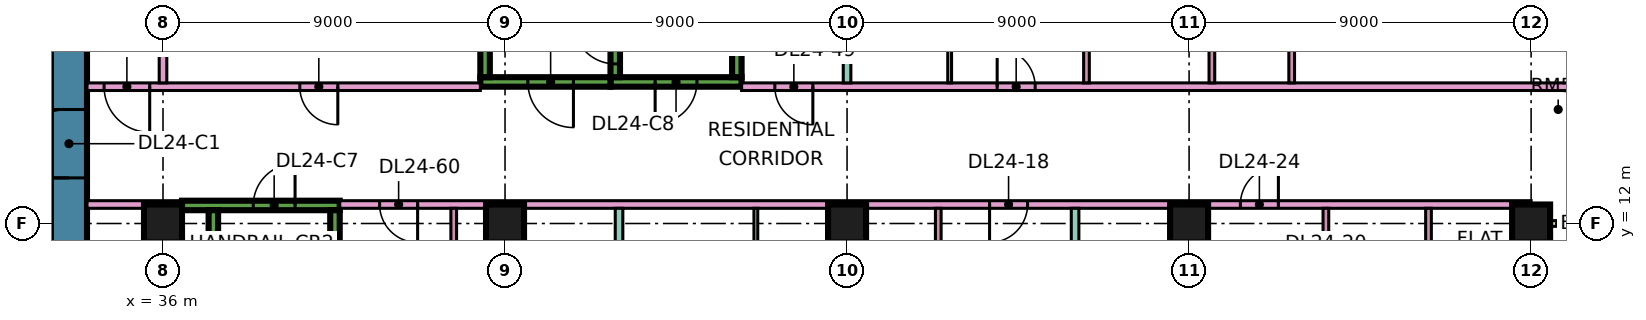
"""IFC4 building model, lengths in metres.
Left out: names, types, materials, properties, quantities, classifications, styles, units other than length and angle.
Written with IfcOpenShell. Run it as: python <this file> out.ifc"""

import sys

from ifc_helpers import new_model, si_unit, direction, frame, frame_2d, origin, origin_2d, place, context, subcontext, project, spatial, rectangle, extrude, element, fill, save


model = new_model("IFC4")
c1 = context("Model", 3, precision=1e-05, world=origin(), true_north=direction((0.0, 1.0)))
c2 = subcontext(c1, "Body", "Model", "MODEL_VIEW")
j1 = project(units=[si_unit("LENGTHUNIT", "METRE"), si_unit("PLANEANGLEUNIT", "RADIAN")], contexts=[c1])
p1 = place(None, origin())
s1 = spatial("IfcSite", under=j1, at=p1, CompositionType="ELEMENT")
p2 = place(p1, origin())
s2 = spatial("IfcBuilding", under=s1, at=p2, CompositionType="ELEMENT")
p3 = place(p2, frame((0.0, 0.0, 106.9)))
s3 = spatial("IfcBuildingStorey", under=s2, at=p3, CompositionType="ELEMENT", Elevation=106.9)
for number, where, z_axis, x_axis in (
    (1, (36.0, 12.0, 0.0), (0.0, 0.0, 1.0), (1.0, 0.0, 0.0)),
    (2, (45.0, 12.0, 0.0), (0.0, 0.0, 1.0), (1.0, 0.0, 0.0)),
    (3, (54.0, 12.0, 0.0), (0.0, 0.0, 1.0), (1.0, 0.0, 0.0)),
    (4, (63.0, 12.0, 0.0), (0.0, 0.0, 1.0), (1.0, 0.0, 0.0)),
    (5, (72.0, 12.0, 0.0), (0.0, 0.0, 1.0), (1.0, 0.0, 0.0)),
):
    element("IfcColumn", number, at=place(p3, frame(where, z_axis=z_axis, x_axis=x_axis)), inside=s3, PredefinedType="COLUMN", context=c2, shape_type="SweptSolid", body=[
        extrude(rectangle(XDim=1.0, YDim=1.0, at=origin_2d()), origin(), (0.0, 0.0, 1.0), 3.75),
    ])
p4 = place(p3, frame((33.525, 7.95, 0.0), z_axis=(0.0, 0.0, 1.0), x_axis=(0.0, 1.0, 0.0)))
e6 = element("IfcWall", 6, at=p4, inside=s3, PredefinedType="SHEAR", context=c2, shape_type="SweptSolid", body=[
    extrude(rectangle(XDim=11.1, YDim=0.95, at=frame_2d((5.55, 0.0))), origin(), (0.0, 0.0, 1.0), 3.75),
])
p5 = place(p4, frame((5.25, 0.0, 0.0)))
e7 = element("IfcOpeningElement", 7, at=p5, cuts=e6, PredefinedType="OPENING", context=c2, shape_type="SweptSolid", body=[
    extrude(rectangle(XDim=1.8, YDim=2.4, at=frame_2d((0.9, 1.2))), frame((0.0, 0.485, 0.0), z_axis=(0.0, -1.0, 0.0), x_axis=(1.0, 0.0, 0.0)), (0.0, 0.0, 1.0), 0.97),
])
p6 = place(p3, frame((36.5, 12.475, 0.0), z_axis=(0.0, 0.0, 1.0), x_axis=(1.0, 0.0, 0.0)))
e8 = element("IfcWall", 8, at=p6, inside=s3, PredefinedType="SHEAR", context=c2, shape_type="SweptSolid", body=[
    extrude(rectangle(XDim=4.15, YDim=0.25, at=frame_2d((2.075, 0.0))), origin(), (0.0, 0.0, 1.0), 3.75),
])
p7 = place(p6, frame((1.875, 0.0, 0.0)))
e9 = element("IfcOpeningElement", 9, at=p7, cuts=e8, PredefinedType="OPENING", context=c2, shape_type="SweptSolid", body=[
    extrude(rectangle(XDim=1.1, YDim=2.2, at=frame_2d((0.55, 1.1))), frame((0.0, 0.135, 0.0), z_axis=(0.0, -1.0, 0.0), x_axis=(1.0, 0.0, 0.0)), (0.0, 0.0, 1.0), 0.27),
])
for number, where, z_axis, x_axis in (
    (10, (37.325, 5.85, 0.0), (0.0, 0.0, 1.0), (0.0, 1.0, 0.0)),
    (11, (40.525, 5.85, 0.0), (0.0, 0.0, 1.0), (0.0, 1.0, 0.0)),
):
    element("IfcWall", number, at=place(p3, frame(where, z_axis=z_axis, x_axis=x_axis)), inside=s3, PredefinedType="SHEAR", context=c2, shape_type="SweptSolid", body=[
        extrude(rectangle(XDim=6.5, YDim=0.25, at=frame_2d((3.25, 0.0))), origin(), (0.0, 0.0, 1.0), 3.75),
    ])
p8 = place(p3, frame((47.775, 15.725, 0.0), z_axis=(0.0, 0.0, 1.0), x_axis=(1.0, 0.0, 0.0)))
e12 = element("IfcWall", 12, at=p8, inside=s3, PredefinedType="SHEAR", context=c2, shape_type="SweptSolid", body=[
    extrude(rectangle(XDim=3.45, YDim=0.25, at=frame_2d((1.725, 0.0))), origin(), (0.0, 0.0, 1.0), 3.75),
])
p9 = place(p8, frame((1.175, 0.0, 0.0)))
e13 = element("IfcOpeningElement", 13, at=p9, cuts=e12, PredefinedType="OPENING", context=c2, shape_type="SweptSolid", body=[
    extrude(rectangle(XDim=1.1, YDim=2.2, at=frame_2d((0.55, 1.1))), frame((0.0, 0.135, 0.0), z_axis=(0.0, -1.0, 0.0), x_axis=(1.0, 0.0, 0.0)), (0.0, 0.0, 1.0), 0.27),
])
p10 = place(p3, frame((47.9, 15.85, 0.0), z_axis=(0.0, 0.0, 1.0), x_axis=(0.0, 1.0, 0.0)))
e14 = element("IfcWall", 14, at=p10, inside=s3, PredefinedType="SHEAR", context=c2, shape_type="SweptSolid", body=[
    extrude(rectangle(XDim=6.5, YDim=0.25, at=frame_2d((3.25, 0.0))), origin(), (0.0, 0.0, 1.0), 3.75),
])
p11 = place(p10, frame((0.35, 0.0, 0.0)))
e15 = element("IfcOpeningElement", 15, at=p11, cuts=e14, PredefinedType="OPENING", context=c2, shape_type="SweptSolid", body=[
    extrude(rectangle(XDim=1.1, YDim=2.2, at=frame_2d((0.55, 1.1))), frame((0.0, 0.135, 0.0), z_axis=(0.0, -1.0, 0.0), x_axis=(1.0, 0.0, 0.0)), (0.0, 0.0, 1.0), 0.27),
])
p12 = place(p3, frame((51.1, 15.85, 0.0), z_axis=(0.0, 0.0, 1.0), x_axis=(0.0, 1.0, 0.0)))
e16 = element("IfcWall", 16, at=p12, inside=s3, PredefinedType="SHEAR", context=c2, shape_type="SweptSolid", body=[
    extrude(rectangle(XDim=6.5, YDim=0.25, at=frame_2d((3.25, 0.0))), origin(), (0.0, 0.0, 1.0), 3.75),
])
p13 = place(p3, frame((44.35, 15.725, 0.0), z_axis=(0.0, 0.0, 1.0), x_axis=(1.0, 0.0, 0.0)))
e17 = element("IfcWall", 17, at=p13, inside=s3, PredefinedType="SHEAR", context=c2, shape_type="SweptSolid", body=[
    extrude(rectangle(XDim=3.425, YDim=0.25, at=frame_2d((1.712, 0.0))), origin(), (0.0, 0.0, 1.0), 3.75),
])
p14 = place(p13, frame((1.25, 0.0, 0.0)))
e18 = element("IfcOpeningElement", 18, at=p14, cuts=e17, PredefinedType="OPENING", context=c2, shape_type="SweptSolid", body=[
    extrude(rectangle(XDim=1.2, YDim=2.2, at=frame_2d((0.6, 1.1))), frame((0.0, 0.135, 0.0), z_axis=(0.0, -1.0, 0.0), x_axis=(1.0, 0.0, 0.0)), (0.0, 0.0, 1.0), 0.27),
])
p15 = place(p3, frame((44.475, 15.85, 0.0), z_axis=(0.0, 0.0, 1.0), x_axis=(0.0, 1.0, 0.0)))
e19 = element("IfcWall", 19, at=p15, inside=s3, PredefinedType="SHEAR", context=c2, shape_type="SweptSolid", body=[
    extrude(rectangle(XDim=6.5, YDim=0.25, at=frame_2d((3.25, 0.0))), origin(), (0.0, 0.0, 1.0), 3.75),
])
p16 = place(p15, frame((1.75, 0.0, 0.0)))
e20 = element("IfcOpeningElement", 20, at=p16, cuts=e19, PredefinedType="OPENING", context=c2, shape_type="SweptSolid", body=[
    extrude(rectangle(XDim=1.1, YDim=2.2, at=frame_2d((0.55, 1.1))), frame((0.0, 0.135, 0.0), z_axis=(0.0, -1.0, 0.0), x_axis=(1.0, 0.0, 0.0)), (0.0, 0.0, 1.0), 0.27),
])
p17 = place(p15, frame((4.3, 0.0, 0.0)))
e21 = element("IfcOpeningElement", 21, at=p17, cuts=e19, PredefinedType="OPENING", context=c2, shape_type="SweptSolid", body=[
    extrude(rectangle(XDim=1.1, YDim=2.2, at=frame_2d((0.55, 1.1))), frame((0.0, 0.135, 0.0), z_axis=(0.0, -1.0, 0.0), x_axis=(1.0, 0.0, 0.0)), (0.0, 0.0, 1.0), 0.27),
])
p18 = place(p3, frame((72.0, 1.575, 0.0), z_axis=(0.0, 0.0, 1.0), x_axis=(0.0, 1.0, 0.0)))
e22 = element("IfcWall", 22, at=p18, inside=s3, PredefinedType="SOLIDWALL", context=c2, shape_type="SweptSolid", body=[
    extrude(rectangle(XDim=10.35, YDim=0.15, at=frame_2d((5.175, 0.0))), origin(), (0.0, 0.0, 1.0), 3.35),
])
p19 = place(p18, frame((2.462, 0.0, 0.0)))
e23 = element("IfcOpeningElement", 23, at=p19, cuts=e22, PredefinedType="OPENING", context=c2, shape_type="SweptSolid", body=[
    extrude(rectangle(XDim=1.8, YDim=2.4, at=frame_2d((0.9, 1.2))), frame((0.0, 0.085, 0.0), z_axis=(0.0, -1.0, 0.0), x_axis=(1.0, 0.0, 0.0)), (0.0, 0.0, 1.0), 0.17),
])
p20 = place(p3, frame((73.5, 12.0, 0.0), z_axis=(0.0, 0.0, 1.0), x_axis=(-1.0, 0.0, 0.0)))
e24 = element("IfcWall", 24, at=p20, inside=s3, PredefinedType="SOLIDWALL", context=c2, shape_type="SweptSolid", body=[
    extrude(rectangle(XDim=1.5, YDim=0.15, at=frame_2d((0.75, 0.0))), origin(), (0.0, 0.0, 1.0), 3.35),
])
p21 = place(p3, frame((34.0, 12.5, 0.0), z_axis=(0.0, 0.0, 1.0), x_axis=(1.0, 0.0, 0.0)))
e25 = element("IfcWall", 25, at=p21, inside=s3, PredefinedType="PARTITIONING", context=c2, shape_type="SweptSolid", body=[
    extrude(rectangle(XDim=2.501, YDim=0.2, at=frame_2d((1.25, 0.0))), origin(), (0.0, 0.0, 1.0), 3.35),
])
p22 = place(p3, frame((34.0, 15.6, 0.0), z_axis=(0.0, 0.0, 1.0), x_axis=(1.0, 0.0, 0.0)))
e26 = element("IfcWall", 26, at=p22, inside=s3, PredefinedType="PARTITIONING", context=c2, shape_type="SweptSolid", body=[
    extrude(rectangle(XDim=10.35, YDim=0.2, at=frame_2d((5.175, 0.0))), origin(), (0.0, 0.0, 1.0), 3.35),
])
p23 = place(p22, frame((5.6, 0.0, 0.0)))
e27 = element("IfcOpeningElement", 27, at=p23, cuts=e26, PredefinedType="OPENING", context=c2, shape_type="SweptSolid", body=[
    extrude(rectangle(XDim=1.0, YDim=2.1, at=frame_2d((0.5, 1.05))), frame((0.0, 0.11, 0.0), z_axis=(0.0, -1.0, 0.0), x_axis=(1.0, 0.0, 0.0)), (0.0, 0.0, 1.0), 0.22),
])
p24 = place(p22, frame((0.45, 0.0, 0.0)))
e28 = element("IfcOpeningElement", 28, at=p24, cuts=e26, PredefinedType="OPENING", context=c2, shape_type="SweptSolid", body=[
    extrude(rectangle(XDim=1.2, YDim=2.1, at=frame_2d((0.6, 1.05))), frame((0.0, 0.11, 0.0), z_axis=(0.0, -1.0, 0.0), x_axis=(1.0, 0.0, 0.0)), (0.0, 0.0, 1.0), 0.22),
])
p25 = place(p3, frame((36.0, 15.7, 0.0), z_axis=(0.0, 0.0, 1.0), x_axis=(0.0, 1.0, 0.0)))
e29 = element("IfcWall", 29, at=p25, inside=s3, PredefinedType="PARTITIONING", context=c2, shape_type="SweptSolid", body=[
    extrude(rectangle(XDim=8.3, YDim=0.2, at=frame_2d((4.15, 0.0))), origin(), (0.0, 0.0, 1.0), 3.35),
])
p26 = place(p3, frame((40.65, 12.5, 0.0), z_axis=(0.0, 0.0, 1.0), x_axis=(1.0, 0.0, 0.0)))
e30 = element("IfcWall", 30, at=p26, inside=s3, PredefinedType="PARTITIONING", context=c2, shape_type="SweptSolid", body=[
    extrude(rectangle(XDim=31.35, YDim=0.2, at=frame_2d((15.675, 0.0))), origin(), (0.0, 0.0, 1.0), 3.35),
])
p27 = place(p26, frame((17.1, 0.0, 0.0)))
e31 = element("IfcOpeningElement", 31, at=p27, cuts=e30, PredefinedType="OPENING", context=c2, shape_type="SweptSolid", body=[
    extrude(rectangle(XDim=1.0, YDim=2.1, at=frame_2d((0.5, 1.05))), frame((0.0, 0.11, 0.0), z_axis=(0.0, -1.0, 0.0), x_axis=(1.0, 0.0, 0.0)), (0.0, 0.0, 1.0), 0.22),
])
p28 = place(p26, frame((23.7, 0.0, 0.0)))
e32 = element("IfcOpeningElement", 32, at=p28, cuts=e30, PredefinedType="OPENING", context=c2, shape_type="SweptSolid", body=[
    extrude(rectangle(XDim=1.0, YDim=2.1, at=frame_2d((0.5, 1.05))), frame((0.0, 0.11, 0.0), z_axis=(0.0, -1.0, 0.0), x_axis=(1.0, 0.0, 0.0)), (0.0, 0.0, 1.0), 0.22),
])
p29 = place(p26, frame((1.05, 0.0, 0.0)))
e33 = element("IfcOpeningElement", 33, at=p29, cuts=e30, PredefinedType="OPENING", context=c2, shape_type="SweptSolid", body=[
    extrude(rectangle(XDim=1.0, YDim=2.1, at=frame_2d((0.5, 1.05))), frame((0.0, 0.11, 0.0), z_axis=(0.0, -1.0, 0.0), x_axis=(1.0, 0.0, 0.0)), (0.0, 0.0, 1.0), 0.22),
])
p30 = place(p3, frame((43.65, 5.825, 0.0), z_axis=(0.0, 0.0, 1.0), x_axis=(0.0, 1.0, 0.0)))
e34 = element("IfcWall", 34, at=p30, inside=s3, PredefinedType="PARTITIONING", context=c2, shape_type="SweptSolid", body=[
    extrude(rectangle(XDim=6.575, YDim=0.15, at=frame_2d((3.288, 0.0))), origin(), (0.0, 0.0, 1.0), 3.35),
])
p31 = place(p30, frame((4.425, 0.0, 0.0)))
e35 = element("IfcOpeningElement", 35, at=p31, cuts=e34, PredefinedType="OPENING", context=c2, shape_type="SweptSolid", body=[
    extrude(rectangle(XDim=0.9, YDim=2.1, at=frame_2d((0.45, 1.05))), frame((0.0, 0.085, 0.0), z_axis=(0.0, -1.0, 0.0), x_axis=(1.0, 0.0, 0.0)), (0.0, 0.0, 1.0), 0.17),
])
p32 = place(p3, frame((48.0, 0.0, 0.0), z_axis=(0.0, 0.0, 1.0), x_axis=(0.0, 1.0, 0.0)))
e36 = element("IfcWall", 36, at=p32, inside=s3, PredefinedType="PARTITIONING", context=c2, shape_type="SweptSolid", body=[
    extrude(rectangle(XDim=12.4, YDim=0.2, at=frame_2d((6.2, 0.0))), origin(), (0.0, 0.0, 1.0), 3.35),
])
p33 = place(p3, frame((51.225, 15.6, 0.0), z_axis=(0.0, 0.0, 1.0), x_axis=(1.0, 0.0, 0.0)))
e37 = element("IfcWall", 37, at=p33, inside=s3, PredefinedType="PARTITIONING", context=c2, shape_type="SweptSolid", body=[
    extrude(rectangle(XDim=22.125, YDim=0.2, at=frame_2d((11.062, 0.0))), origin(), (0.0, 0.0, 1.0), 3.35),
])
p34 = place(p33, frame((6.725, 0.0, 0.0)))
e38 = element("IfcOpeningElement", 38, at=p34, cuts=e37, PredefinedType="OPENING", context=c2, shape_type="SweptSolid", body=[
    extrude(rectangle(XDim=1.0, YDim=2.1, at=frame_2d((0.5, 1.05))), frame((0.0, 0.11, 0.0), z_axis=(0.0, -1.0, 0.0), x_axis=(1.0, 0.0, 0.0)), (0.0, 0.0, 1.0), 0.22),
])
p35 = place(p33, frame((0.875, 0.0, 0.0)))
e39 = element("IfcOpeningElement", 39, at=p35, cuts=e37, PredefinedType="OPENING", context=c2, shape_type="SweptSolid", body=[
    extrude(rectangle(XDim=1.0, YDim=2.1, at=frame_2d((0.5, 1.05))), frame((0.0, 0.11, 0.0), z_axis=(0.0, -1.0, 0.0), x_axis=(1.0, 0.0, 0.0)), (0.0, 0.0, 1.0), 0.22),
])
p36 = place(p3, frame((51.6, 7.175, 0.0), z_axis=(0.0, 0.0, 1.0), x_axis=(0.0, 1.0, 0.0)))
e40 = element("IfcWall", 40, at=p36, inside=s3, PredefinedType="PARTITIONING", context=c2, shape_type="SweptSolid", body=[
    extrude(rectangle(XDim=5.225, YDim=0.1, at=frame_2d((2.612, 0.0))), origin(), (0.0, 0.0, 1.0), 3.35),
])
p37 = place(p3, frame((54.0, 7.175, 0.0), z_axis=(0.0, 0.0, 1.0), x_axis=(0.0, 1.0, 0.0)))
e41 = element("IfcWall", 41, at=p37, inside=s3, PredefinedType="PARTITIONING", context=c2, shape_type="SweptSolid", body=[
    extrude(rectangle(XDim=5.225, YDim=0.15, at=frame_2d((2.612, 0.0))), origin(), (0.0, 0.0, 1.0), 3.35),
])
p38 = place(p3, frame((54.0, 15.7, 0.0), z_axis=(0.0, 0.0, 1.0), x_axis=(0.0, 1.0, 0.0)))
e42 = element("IfcWall", 42, at=p38, inside=s3, PredefinedType="PARTITIONING", context=c2, shape_type="SweptSolid", body=[
    extrude(rectangle(XDim=8.226, YDim=0.2, at=frame_2d((4.113, 0.0))), origin(), (0.0, 0.0, 1.0), 3.35),
])
p39 = place(p3, frame((56.4, 7.175, 0.0), z_axis=(0.0, 0.0, 1.0), x_axis=(0.0, 1.0, 0.0)))
e43 = element("IfcWall", 43, at=p39, inside=s3, PredefinedType="PARTITIONING", context=c2, shape_type="SweptSolid", body=[
    extrude(rectangle(XDim=5.225, YDim=0.15, at=frame_2d((2.612, 0.0))), origin(), (0.0, 0.0, 1.0), 3.35),
])
p40 = place(p3, frame((56.7, 15.7, 0.0), z_axis=(0.0, 0.0, 1.0), x_axis=(0.0, 1.0, 0.0)))
e44 = element("IfcWall", 44, at=p40, inside=s3, PredefinedType="PARTITIONING", context=c2, shape_type="SweptSolid", body=[
    extrude(rectangle(XDim=2.95, YDim=0.1, at=frame_2d((1.475, 0.0))), origin(), (0.0, 0.0, 1.0), 3.35),
])
p41 = place(p40, frame((0.95, 0.0, 0.0)))
e45 = element("IfcOpeningElement", 45, at=p41, cuts=e44, PredefinedType="OPENING", context=c2, shape_type="SweptSolid", body=[
    extrude(rectangle(XDim=0.9, YDim=2.1, at=frame_2d((0.45, 1.05))), frame((0.0, 0.06, 0.0), z_axis=(0.0, -1.0, 0.0), x_axis=(1.0, 0.0, 0.0)), (0.0, 0.0, 1.0), 0.12),
])
p42 = place(p3, frame((60.0, 0.0, 0.0), z_axis=(0.0, 0.0, 1.0), x_axis=(0.0, 1.0, 0.0)))
e46 = element("IfcWall", 46, at=p42, inside=s3, PredefinedType="PARTITIONING", context=c2, shape_type="SweptSolid", body=[
    extrude(rectangle(XDim=12.4, YDim=0.2, at=frame_2d((6.2, 0.0))), origin(), (0.0, 0.0, 1.0), 3.35),
])
p43 = place(p3, frame((60.3, 15.7, 0.0), z_axis=(0.0, 0.0, 1.0), x_axis=(0.0, 1.0, 0.0)))
e47 = element("IfcWall", 47, at=p43, inside=s3, PredefinedType="PARTITIONING", context=c2, shape_type="SweptSolid", body=[
    extrude(rectangle(XDim=2.825, YDim=0.15, at=frame_2d((1.413, 0.0))), origin(), (0.0, 0.0, 1.0), 3.35),
])
p44 = place(p43, frame((0.95, 0.0, 0.0)))
e48 = element("IfcOpeningElement", 48, at=p44, cuts=e47, PredefinedType="OPENING", context=c2, shape_type="SweptSolid", body=[
    extrude(rectangle(XDim=0.8, YDim=2.1, at=frame_2d((0.4, 1.05))), frame((0.0, 0.085, 0.0), z_axis=(0.0, -1.0, 0.0), x_axis=(1.0, 0.0, 0.0)), (0.0, 0.0, 1.0), 0.17),
])
p45 = place(p3, frame((63.0, 8.25, 0.0), z_axis=(0.0, 0.0, 1.0), x_axis=(0.0, 1.0, 0.0)))
e49 = element("IfcWall", 49, at=p45, inside=s3, PredefinedType="PARTITIONING", context=c2, shape_type="SweptSolid", body=[
    extrude(rectangle(XDim=4.15, YDim=0.1, at=frame_2d((2.075, 0.0))), origin(), (0.0, 0.0, 1.0), 3.35),
])
p46 = place(p45, frame((1.7, 0.0, 0.0)))
e50 = element("IfcOpeningElement", 50, at=p46, cuts=e49, PredefinedType="OPENING", context=c2, shape_type="SweptSolid", body=[
    extrude(rectangle(XDim=0.9, YDim=2.1, at=frame_2d((0.45, 1.05))), frame((0.0, 0.06, 0.0), z_axis=(0.0, -1.0, 0.0), x_axis=(1.0, 0.0, 0.0)), (0.0, 0.0, 1.0), 0.12),
])
for number, where, z_axis, x_axis in (
    (51, (63.6, 15.7, 0.0), (0.0, 0.0, 1.0), (0.0, 1.0, 0.0)),
    (52, (65.7, 15.7, 0.0), (0.0, 0.0, 1.0), (0.0, 1.0, 0.0)),
):
    element("IfcWall", number, at=place(p3, frame(where, z_axis=z_axis, x_axis=x_axis)), inside=s3, PredefinedType="PARTITIONING", context=c2, shape_type="SweptSolid", body=[
        extrude(rectangle(XDim=2.825, YDim=0.15, at=frame_2d((1.413, 0.0))), origin(), (0.0, 0.0, 1.0), 3.35),
    ])
p47 = place(p3, frame((66.6, 8.375, 0.0), z_axis=(0.0, 0.0, 1.0), x_axis=(0.0, 1.0, 0.0)))
e53 = element("IfcWall", 53, at=p47, inside=s3, PredefinedType="PARTITIONING", context=c2, shape_type="SweptSolid", body=[
    extrude(rectangle(XDim=4.025, YDim=0.15, at=frame_2d((2.012, 0.0))), origin(), (0.0, 0.0, 1.0), 3.35),
])
p48 = place(p47, frame((1.575, 0.0, 0.0)))
e54 = element("IfcOpeningElement", 54, at=p48, cuts=e53, PredefinedType="OPENING", context=c2, shape_type="SweptSolid", body=[
    extrude(rectangle(XDim=0.8, YDim=2.1, at=frame_2d((0.4, 1.05))), frame((0.0, 0.085, 0.0), z_axis=(0.0, -1.0, 0.0), x_axis=(1.0, 0.0, 0.0)), (0.0, 0.0, 1.0), 0.17),
])
p49 = place(p3, frame((69.3, 8.375, 0.0), z_axis=(0.0, 0.0, 1.0), x_axis=(0.0, 1.0, 0.0)))
e55 = element("IfcWall", 55, at=p49, inside=s3, PredefinedType="PARTITIONING", context=c2, shape_type="SweptSolid", body=[
    extrude(rectangle(XDim=4.025, YDim=0.15, at=frame_2d((2.012, 0.0))), origin(), (0.0, 0.0, 1.0), 3.35),
])
p50 = place(p5, origin())
e56 = element("IfcDoor", 56, at=p50, inside=s3, OperationType="DOUBLE_DOOR_SINGLE_SWING", PredefinedType="DOOR", context=c2, shape_type="SweptSolid", body=[
    extrude(rectangle(XDim=1.8, YDim=2.4, at=frame_2d((0.9, 1.2))), frame((0.0, 0.025, 0.0), z_axis=(0.0, -1.0, 0.0), x_axis=(1.0, 0.0, 0.0)), (0.0, 0.0, 1.0), 0.05),
])
fill(e7, e56)
p51 = place(p7, frame((1.1, 0.0, 0.0), z_axis=(0.0, 0.0, 1.0), x_axis=(-1.0, 0.0, 0.0)))
e57 = element("IfcDoor", 57, at=p51, inside=s3, OperationType="SINGLE_SWING_RIGHT", PredefinedType="DOOR", context=c2, shape_type="SweptSolid", body=[
    extrude(rectangle(XDim=1.1, YDim=2.2, at=frame_2d((0.55, 1.1))), frame((0.0, 0.025, 0.0), z_axis=(0.0, -1.0, 0.0), x_axis=(1.0, 0.0, 0.0)), (0.0, 0.0, 1.0), 0.05),
])
fill(e9, e57)
p52 = place(p9, frame((1.1, 0.0, 0.0), z_axis=(0.0, 0.0, 1.0), x_axis=(-1.0, 0.0, 0.0)))
e58 = element("IfcDoor", 58, at=p52, inside=s3, OperationType="SINGLE_SWING_LEFT", PredefinedType="DOOR", context=c2, shape_type="SweptSolid", body=[
    extrude(rectangle(XDim=1.1, YDim=2.2, at=frame_2d((0.55, 1.1))), frame((0.0, 0.025, 0.0), z_axis=(0.0, -1.0, 0.0), x_axis=(1.0, 0.0, 0.0)), (0.0, 0.0, 1.0), 0.05),
])
fill(e13, e58)
p53 = place(p14, origin())
e59 = element("IfcDoor", 59, at=p53, inside=s3, OperationType="SINGLE_SWING_RIGHT", PredefinedType="DOOR", context=c2, shape_type="SweptSolid", body=[
    extrude(rectangle(XDim=1.2, YDim=2.2, at=frame_2d((0.6, 1.1))), frame((0.0, 0.025, 0.0), z_axis=(0.0, -1.0, 0.0), x_axis=(1.0, 0.0, 0.0)), (0.0, 0.0, 1.0), 0.05),
])
fill(e18, e59)
p54 = place(p11, frame((1.1, 0.0, 0.0), z_axis=(0.0, 0.0, 1.0), x_axis=(-1.0, 0.0, 0.0)))
e60 = element("IfcDoor", 60, at=p54, inside=s3, OperationType="SINGLE_SWING_RIGHT", PredefinedType="DOOR", context=c2, shape_type="SweptSolid", body=[
    extrude(rectangle(XDim=1.1, YDim=2.2, at=frame_2d((0.55, 1.1))), frame((0.0, 0.025, 0.0), z_axis=(0.0, -1.0, 0.0), x_axis=(1.0, 0.0, 0.0)), (0.0, 0.0, 1.0), 0.05),
])
fill(e15, e60)
p55 = place(p23, origin())
e61 = element("IfcDoor", 61, at=p55, inside=s3, OperationType="SINGLE_SWING_RIGHT", PredefinedType="DOOR", context=c2, shape_type="SweptSolid", body=[
    extrude(rectangle(XDim=1.0, YDim=2.1, at=frame_2d((0.5, 1.05))), frame((0.0, 0.025, 0.0), z_axis=(0.0, -1.0, 0.0), x_axis=(1.0, 0.0, 0.0)), (0.0, 0.0, 1.0), 0.05),
])
fill(e27, e61)
p56 = place(p34, origin())
e62 = element("IfcDoor", 62, at=p56, inside=s3, OperationType="SINGLE_SWING_LEFT", PredefinedType="DOOR", context=c2, shape_type="SweptSolid", body=[
    extrude(rectangle(XDim=1.0, YDim=2.1, at=frame_2d((0.5, 1.05))), frame((0.0, 0.025, 0.0), z_axis=(0.0, -1.0, 0.0), x_axis=(1.0, 0.0, 0.0)), (0.0, 0.0, 1.0), 0.05),
])
fill(e38, e62)
p57 = place(p27, frame((1.0, 0.0, 0.0), z_axis=(0.0, 0.0, 1.0), x_axis=(-1.0, 0.0, 0.0)))
e63 = element("IfcDoor", 63, at=p57, inside=s3, OperationType="SINGLE_SWING_LEFT", PredefinedType="DOOR", context=c2, shape_type="SweptSolid", body=[
    extrude(rectangle(XDim=1.0, YDim=2.1, at=frame_2d((0.5, 1.05))), frame((0.0, 0.025, 0.0), z_axis=(0.0, -1.0, 0.0), x_axis=(1.0, 0.0, 0.0)), (0.0, 0.0, 1.0), 0.05),
])
fill(e31, e63)
p58 = place(p28, frame((1.0, 0.0, 0.0), z_axis=(0.0, 0.0, 1.0), x_axis=(-1.0, 0.0, 0.0)))
e64 = element("IfcDoor", 64, at=p58, inside=s3, OperationType="SINGLE_SWING_RIGHT", PredefinedType="DOOR", context=c2, shape_type="SweptSolid", body=[
    extrude(rectangle(XDim=1.0, YDim=2.1, at=frame_2d((0.5, 1.05))), frame((0.0, 0.025, 0.0), z_axis=(0.0, -1.0, 0.0), x_axis=(1.0, 0.0, 0.0)), (0.0, 0.0, 1.0), 0.05),
])
fill(e32, e64)
p59 = place(p24, origin())
e65 = element("IfcDoor", 65, at=p59, inside=s3, OperationType="SINGLE_SWING_RIGHT", PredefinedType="DOOR", context=c2, shape_type="SweptSolid", body=[
    extrude(rectangle(XDim=1.2, YDim=2.1, at=frame_2d((0.6, 1.05))), frame((0.0, 0.025, 0.0), z_axis=(0.0, -1.0, 0.0), x_axis=(1.0, 0.0, 0.0)), (0.0, 0.0, 1.0), 0.05),
])
fill(e28, e65)
p60 = place(p35, origin())
e66 = element("IfcDoor", 66, at=p60, inside=s3, OperationType="SINGLE_SWING_RIGHT", PredefinedType="DOOR", context=c2, shape_type="SweptSolid", body=[
    extrude(rectangle(XDim=1.0, YDim=2.1, at=frame_2d((0.5, 1.05))), frame((0.0, 0.025, 0.0), z_axis=(0.0, -1.0, 0.0), x_axis=(1.0, 0.0, 0.0)), (0.0, 0.0, 1.0), 0.05),
])
fill(e39, e66)
p61 = place(p29, origin())
e67 = element("IfcDoor", 67, at=p61, inside=s3, OperationType="SINGLE_SWING_RIGHT", PredefinedType="DOOR", context=c2, shape_type="SweptSolid", body=[
    extrude(rectangle(XDim=1.0, YDim=2.1, at=frame_2d((0.5, 1.05))), frame((0.0, 0.025, 0.0), z_axis=(0.0, -1.0, 0.0), x_axis=(1.0, 0.0, 0.0)), (0.0, 0.0, 1.0), 0.05),
])
fill(e33, e67)
save(model, sys.argv[1])
